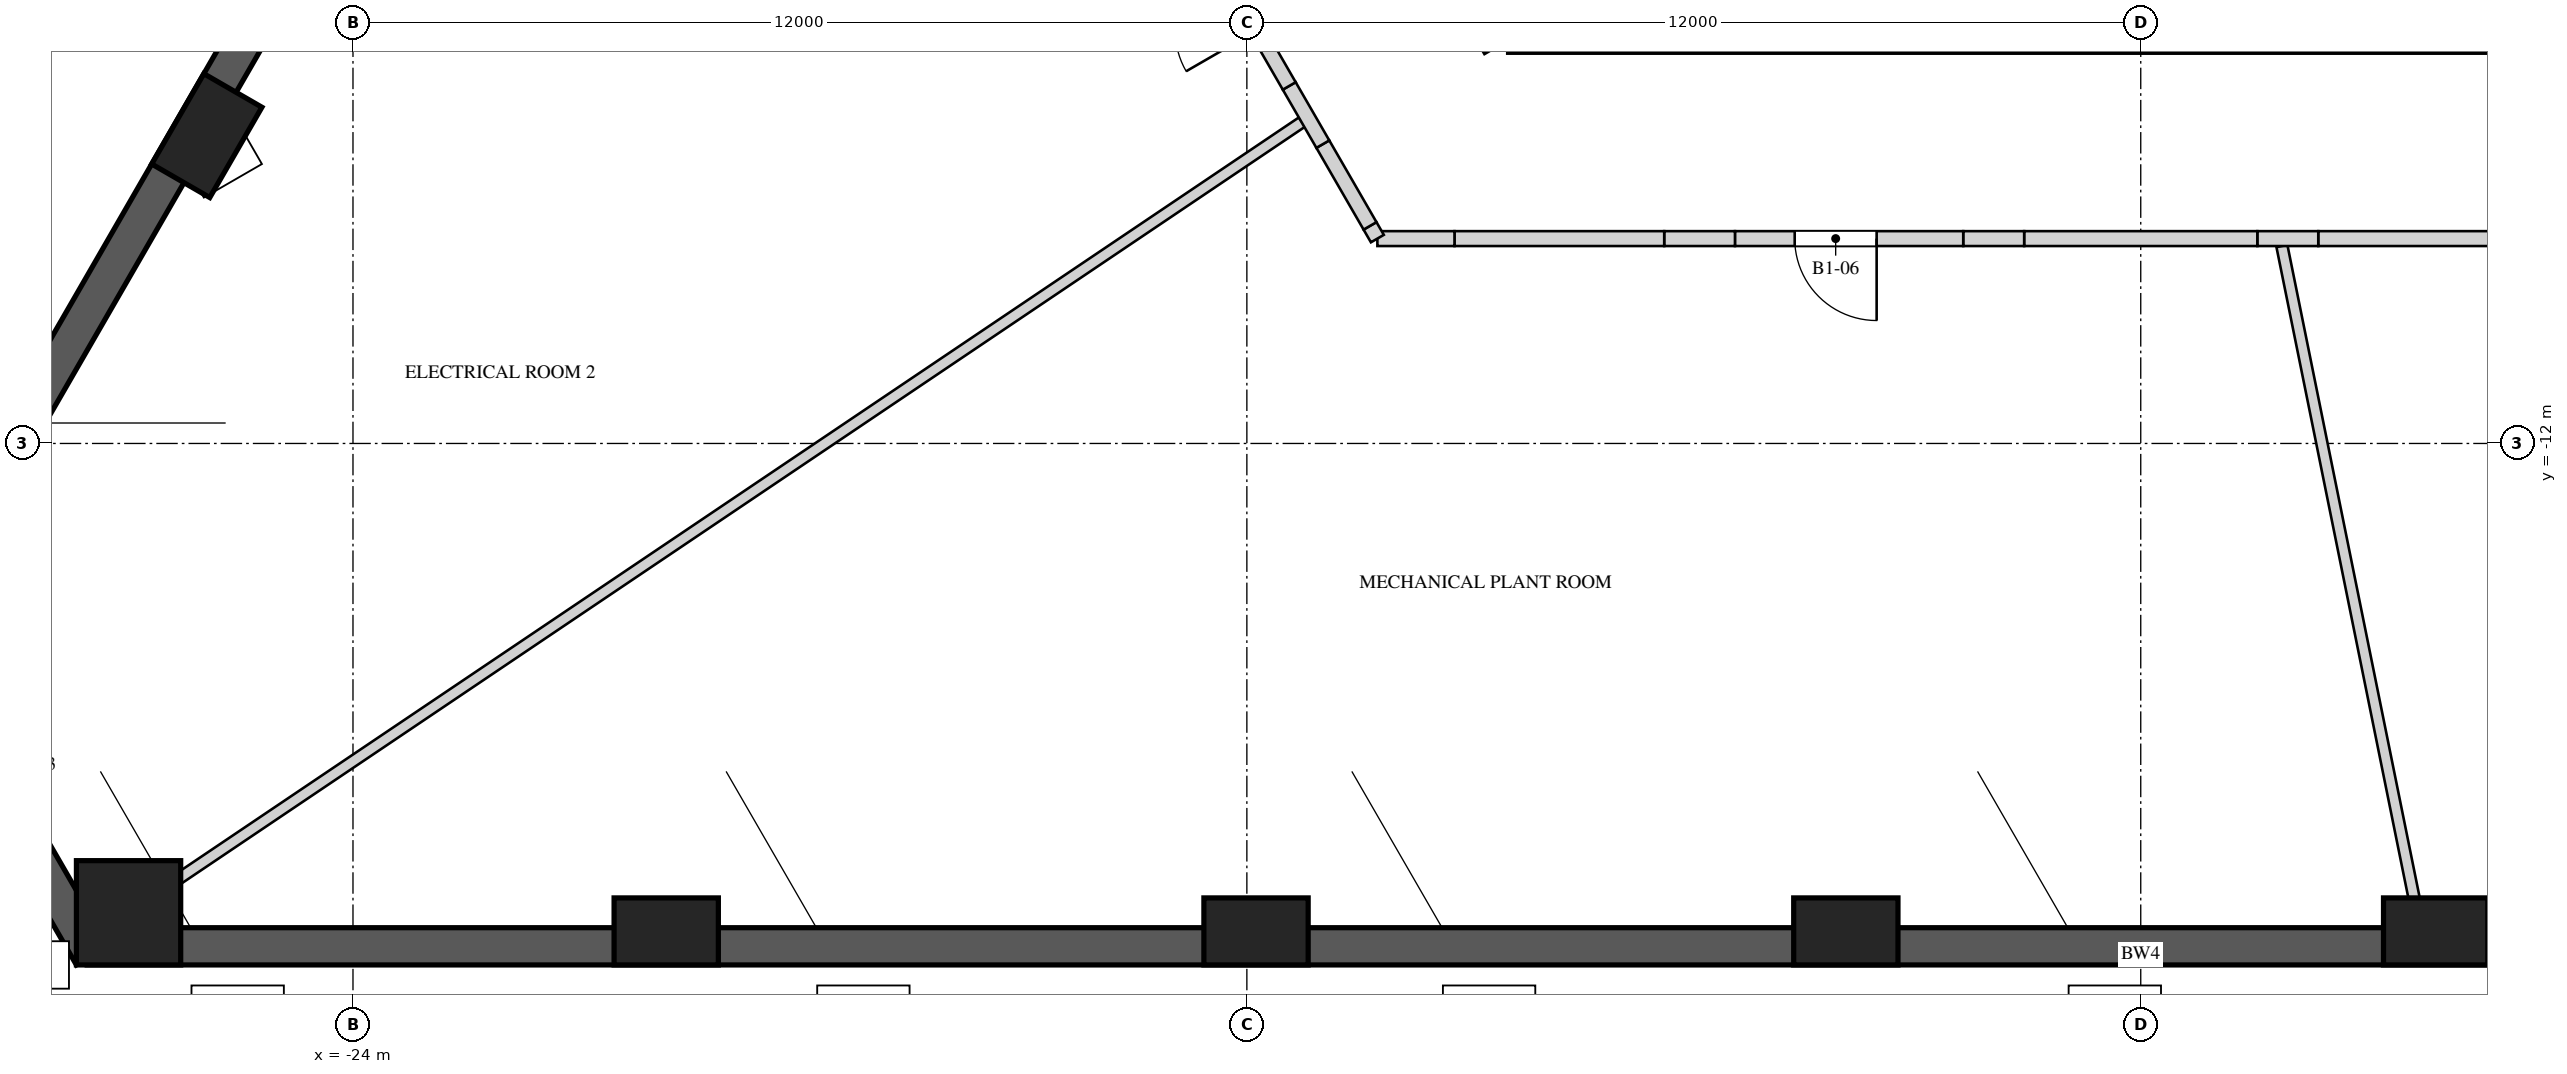
"""IFC4 building model, lengths in metres.
Left out: names, types, materials, properties, quantities, classifications, styles, units other than length and angle.
Written with IfcOpenShell. Run it as: python <this file> out.ifc"""

import sys

from ifc_helpers import new_model, si_unit, direction, frame, frame_2d, origin, origin_2d, place, context, subcontext, project, spatial, rectangle, extrude, element, fill, save


model = new_model("IFC4")
c1 = context("Model", 3, precision=1e-05, world=origin(), true_north=direction((0.0, 1.0)))
c2 = subcontext(c1, "Body", "Model", "MODEL_VIEW")
j1 = project(units=[si_unit("LENGTHUNIT", "METRE"), si_unit("PLANEANGLEUNIT", "RADIAN")], contexts=[c1])
p1 = place(None, origin())
s1 = spatial("IfcSite", under=j1, at=p1, CompositionType="ELEMENT")
p2 = place(p1, origin())
s2 = spatial("IfcBuilding", under=s1, at=p2, CompositionType="ELEMENT")
p3 = place(p2, frame((0.0, 0.0, -5.0)))
s3 = spatial("IfcBuildingStorey", under=s2, at=p3, CompositionType="ELEMENT", Elevation=-5.0)
p4 = place(p3, frame((-2.454, 33.25, -0.3), z_axis=(0.0, 0.0, 1.0), x_axis=(-0.500001743317, -0.866024397277, 0.0)))
e1 = element("IfcWall", 1, at=p4, inside=s3, PredefinedType="SHEAR", context=c2, shape_type="SweptSolid", body=[
    extrude(rectangle(XDim=55.137, YDim=0.5, at=frame_2d((27.568, 0.0))), origin(), (0.0, 0.0, 1.0), 5.3),
])
p5 = place(p3, frame((-30.094, -14.375, -0.3), z_axis=(0.0, 0.0, 1.0), x_axis=(0.50000986103, -0.866019710441, 0.0)))
e2 = element("IfcWall", 2, at=p5, inside=s3, PredefinedType="SHEAR", context=c2, shape_type="SweptSolid", body=[
    extrude(rectangle(XDim=5.196, YDim=0.5, at=frame_2d((2.598, 0.0))), origin(), (0.0, 0.0, 1.0), 5.3),
])
p6 = place(p3, frame((-27.569, -18.75, -0.3), z_axis=(0.0, 0.0, 1.0), x_axis=(1.0, 0.0, 0.0)))
e3 = element("IfcWall", 3, at=p6, inside=s3, PredefinedType="SHEAR", context=c2, shape_type="SweptSolid", body=[
    extrude(rectangle(XDim=55.137, YDim=0.5, at=frame_2d((27.569, 0.0))), origin(), (0.0, 0.0, 1.0), 5.3),
])
p7 = place(p3, frame((30.022, -14.5, -0.3), z_axis=(0.0, 0.0, 1.0), x_axis=(-0.500001743317, 0.866024397277, 0.0)))
e4 = element("IfcWall", 4, at=p7, inside=s3, PredefinedType="SHEAR", context=c2, shape_type="SweptSolid", body=[
    extrude(rectangle(XDim=55.137, YDim=0.5, at=frame_2d((27.568, 0.0))), origin(), (0.0, 0.0, 1.0), 5.3),
])
p8 = place(p3, frame((-25.962, -7.868, -0.3), z_axis=(0.0, 0.0, 1.0), x_axis=(-0.5, -0.866025403784, 0.0)))
e5 = element("IfcColumn", 5, at=p8, inside=s3, PredefinedType="COLUMN", context=c2, shape_type="SweptSolid", body=[
    extrude(rectangle(XDim=1.4, YDim=0.9, at=origin_2d()), origin(), (0.0, 0.0, 1.0), 5.3),
])
p9 = place(p3, frame((-27.013, -18.3, -0.3), z_axis=(0.0, 0.0, 1.0), x_axis=(1.0, 0.0, 0.0)))
e6 = element("IfcColumn", 6, at=p9, inside=s3, PredefinedType="COLUMN", context=c2, shape_type="SweptSolid", body=[
    extrude(rectangle(XDim=1.4, YDim=1.4, at=origin_2d()), origin(), (0.0, 0.0, 1.0), 5.3),
])
for number, where, z_axis, x_axis in (
    (7, (-19.795, -18.55, -0.3), (0.0, 0.0, 1.0), (1.0, 0.0, 0.0)),
    (8, (-11.877, -18.55, -0.3), (0.0, 0.0, 1.0), (1.0, 0.0, 0.0)),
    (9, (-3.959, -18.55, -0.3), (0.0, 0.0, 1.0), (1.0, 0.0, 0.0)),
    (10, (3.959, -18.55, -0.3), (0.0, 0.0, 1.0), (1.0, 0.0, 0.0)),
):
    element("IfcColumn", number, at=place(p3, frame(where, z_axis=z_axis, x_axis=x_axis)), inside=s3, PredefinedType="COLUMN", context=c2, shape_type="SweptSolid", body=[
        extrude(rectangle(XDim=1.4, YDim=0.9, at=origin_2d()), origin(), (0.0, 0.0, 1.0), 5.3),
    ])
p10 = place(p3, frame((-11.26, -7.686, 0.0), z_axis=(0.0, 0.0, 1.0), x_axis=(-0.829436209698, -0.558601444718, 0.0)))
e11 = element("IfcWall", 11, at=p10, inside=s3, PredefinedType="PARTITIONING", context=c2, shape_type="SweptSolid", body=[
    extrude(rectangle(XDim=19.307, YDim=0.15, at=frame_2d((9.653, 0.0))), origin(), (0.0, 0.0, 1.0), 3.55),
])
p11 = place(p3, frame((1.895, -9.35, 0.0), z_axis=(0.0, 0.0, 1.0), x_axis=(0.198667918865, -0.980066864053, 0.0)))
e12 = element("IfcWall", 12, at=p11, inside=s3, PredefinedType="PARTITIONING", context=c2, shape_type="SweptSolid", body=[
    extrude(rectangle(XDim=9.234, YDim=0.15, at=frame_2d((4.617, 0.0))), origin(), (0.0, 0.0, 1.0), 3.75),
])
p12 = place(p3, frame((5.391, -9.25, 0.0), z_axis=(0.0, 0.0, 1.0), x_axis=(-1.0, 0.0, 0.0)))
e13 = element("IfcWall", 13, at=p12, inside=s3, PredefinedType="SOLIDWALL", context=c2, shape_type="SweptSolid", body=[
    extrude(rectangle(XDim=3.008, YDim=0.2, at=frame_2d((1.504, 0.0))), origin(), (0.0, 0.0, 1.0), 4.65),
])
p13 = place(p3, frame((2.383, -9.25, 0.0), z_axis=(0.0, 0.0, 1.0), x_axis=(-1.0, 0.0, 0.0)))
e14 = element("IfcWall", 14, at=p13, inside=s3, PredefinedType="SOLIDWALL", context=c2, shape_type="SweptSolid", body=[
    extrude(rectangle(XDim=0.818, YDim=0.2, at=frame_2d((0.409, 0.0))), origin(), (0.0, 0.0, 1.0), 3.75),
])
p14 = place(p3, frame((1.565, -9.25, 0.0), z_axis=(0.0, 0.0, 1.0), x_axis=(-1.0, 0.0, 0.0)))
e15 = element("IfcWall", 15, at=p14, inside=s3, PredefinedType="SOLIDWALL", context=c2, shape_type="SweptSolid", body=[
    extrude(rectangle(XDim=3.13, YDim=0.2, at=frame_2d((1.565, 0.0))), origin(), (0.0, 0.0, 1.0), 4.65),
])
p15 = place(p3, frame((-1.565, -9.25, 0.0), z_axis=(0.0, 0.0, 1.0), x_axis=(-1.0, 0.0, 0.0)))
e16 = element("IfcWall", 16, at=p15, inside=s3, PredefinedType="SOLIDWALL", context=c2, shape_type="SweptSolid", body=[
    extrude(rectangle(XDim=0.818, YDim=0.2, at=frame_2d((0.409, 0.0))), origin(), (0.0, 0.0, 1.0), 3.75),
])
p16 = place(p3, frame((-2.383, -9.25, 0.0), z_axis=(0.0, 0.0, 1.0), x_axis=(-1.0, 0.0, 0.0)))
e17 = element("IfcWall", 17, at=p16, inside=s3, PredefinedType="SOLIDWALL", context=c2, shape_type="SweptSolid", body=[
    extrude(rectangle(XDim=3.064, YDim=0.2, at=frame_2d((1.532, 0.0))), origin(), (0.0, 0.0, 1.0), 4.65),
])
p17 = place(p16, frame((1.162, 0.0, 0.0)))
e18 = element("IfcOpeningElement", 18, at=p17, cuts=e17, PredefinedType="OPENING", context=c2, shape_type="SweptSolid", body=[
    extrude(rectangle(XDim=1.1, YDim=2.4, at=frame_2d((0.55, 1.2))), frame((0.0, 0.11, 0.0), z_axis=(0.0, -1.0, 0.0), x_axis=(1.0, 0.0, 0.0)), (0.0, 0.0, 1.0), 0.22),
])
p18 = place(p3, frame((-5.448, -9.25, 0.0), z_axis=(0.0, 0.0, 1.0), x_axis=(-1.0, 0.0, 0.0)))
e19 = element("IfcWall", 19, at=p18, inside=s3, PredefinedType="SOLIDWALL", context=c2, shape_type="SweptSolid", body=[
    extrude(rectangle(XDim=0.95, YDim=0.2, at=frame_2d((0.475, 0.0))), origin(), (0.0, 0.0, 1.0), 3.75),
])
p19 = place(p3, frame((-6.397, -9.25, 0.0), z_axis=(0.0, 0.0, 1.0), x_axis=(-1.0, 0.0, 0.0)))
e20 = element("IfcWall", 20, at=p19, inside=s3, PredefinedType="SOLIDWALL", context=c2, shape_type="SweptSolid", body=[
    extrude(rectangle(XDim=2.815, YDim=0.2, at=frame_2d((1.408, 0.0))), origin(), (0.0, 0.0, 1.0), 4.65),
])
p20 = place(p3, frame((-9.213, -9.25, 0.0), z_axis=(0.0, 0.0, 1.0), x_axis=(-1.0, 0.0, 0.0)))
e21 = element("IfcWall", 21, at=p20, inside=s3, PredefinedType="SOLIDWALL", context=c2, shape_type="SweptSolid", body=[
    extrude(rectangle(XDim=1.035, YDim=0.2, at=frame_2d((0.518, 0.0))), origin(), (0.0, 0.0, 1.0), 3.55),
])
p21 = place(p3, frame((-10.248, -9.25, 0.0), z_axis=(0.0, 0.0, 1.0), x_axis=(-0.499865263774, 0.866103179807, 0.0)))
e22 = element("IfcWall", 22, at=p21, inside=s3, PredefinedType="SOLIDWALL", context=c2, shape_type="SweptSolid", body=[
    extrude(rectangle(XDim=0.197, YDim=0.2, at=frame_2d((0.099, 0.0))), origin(), (0.0, 0.0, 1.0), 3.55),
])
p22 = place(p3, frame((-10.347, -9.079, 0.0), z_axis=(0.0, 0.0, 1.0), x_axis=(-0.499911523785, 0.866076479525, 0.0)))
e23 = element("IfcWall", 23, at=p22, inside=s3, PredefinedType="SOLIDWALL", context=c2, shape_type="SweptSolid", body=[
    extrude(rectangle(XDim=1.267, YDim=0.2, at=frame_2d((0.633, 0.0))), origin(), (0.0, 0.0, 1.0), 4.65),
])
p23 = place(p3, frame((-10.98, -7.982, 0.0), z_axis=(0.0, 0.0, 1.0), x_axis=(-0.500097243556, 0.865969252911, 0.0)))
e24 = element("IfcWall", 24, at=p23, inside=s3, PredefinedType="SOLIDWALL", context=c2, shape_type="SweptSolid", body=[
    extrude(rectangle(XDim=0.902, YDim=0.2, at=frame_2d((0.451, 0.0))), origin(), (0.0, 0.0, 1.0), 3.55),
])
p24 = place(p3, frame((-11.431, -7.201, 0.0), z_axis=(0.0, 0.0, 1.0), x_axis=(-0.500017246033, 0.866015446554, 0.0)))
e25 = element("IfcWall", 25, at=p24, inside=s3, PredefinedType="SOLIDWALL", context=c2, shape_type="SweptSolid", body=[
    extrude(rectangle(XDim=0.812, YDim=0.2, at=frame_2d((0.406, 0.0))), origin(), (0.0, 0.0, 1.0), 4.65),
])
p25 = place(p17, origin())
e26 = element("IfcDoor", 26, at=p25, inside=s3, OperationType="SINGLE_SWING_RIGHT", PredefinedType="DOOR", context=c2, shape_type="SweptSolid", body=[
    extrude(rectangle(XDim=1.1, YDim=2.4, at=frame_2d((0.55, 1.2))), frame((0.0, 0.025, 0.0), z_axis=(0.0, -1.0, 0.0), x_axis=(1.0, 0.0, 0.0)), (0.0, 0.0, 1.0), 0.05),
])
fill(e18, e26)
save(model, sys.argv[1])
